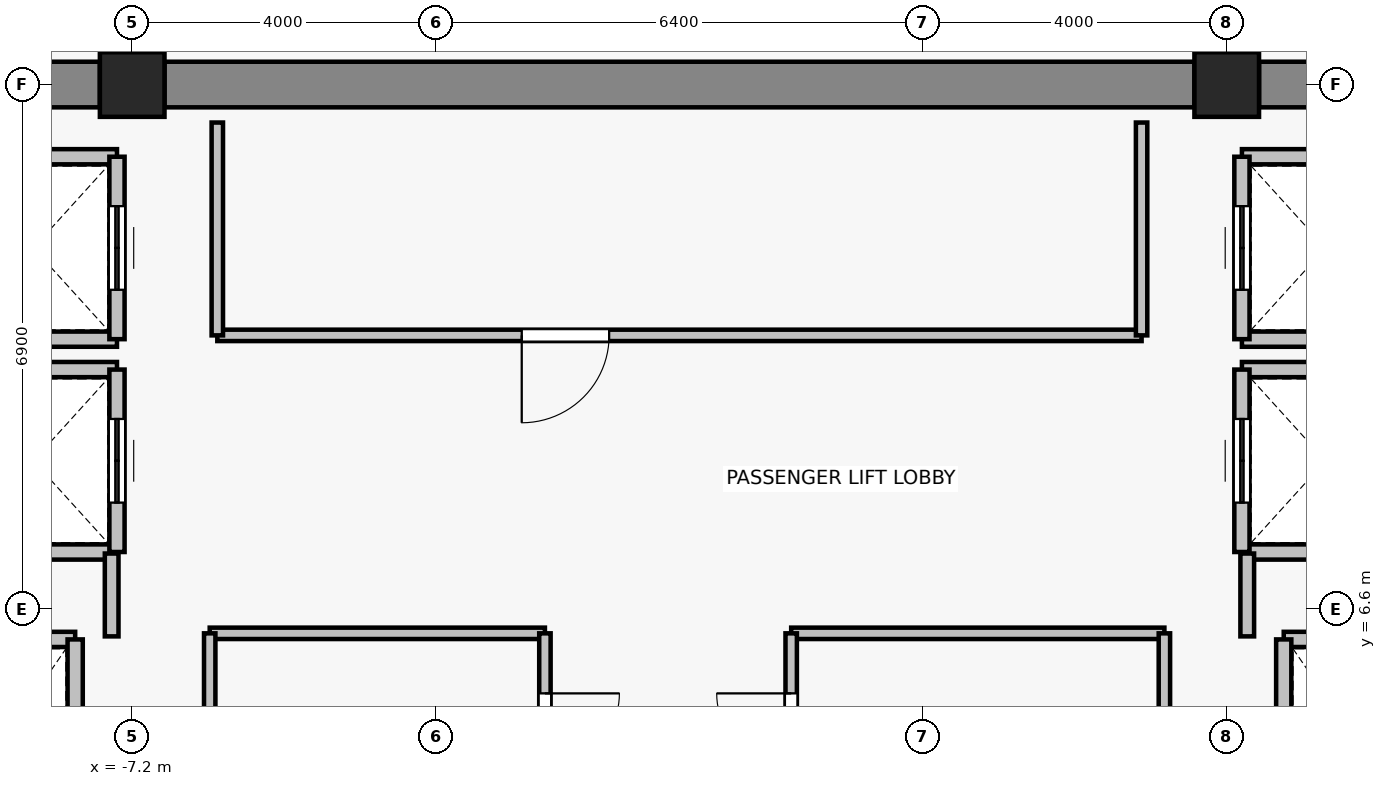
"""IFC4 building model, lengths in metres.
Left out: names, types, materials, properties, quantities, classifications, styles, units other than length and angle.
Written with IfcOpenShell. Run it as: python <this file> out.ifc"""

import sys

from ifc_helpers import new_model, si_unit, direction, frame, frame_2d, origin, origin_2d, place, context, subcontext, project, spatial, rectangle, extrude, source, transform, mapped, element, fill, save


model = new_model("IFC4")
c1 = context("Model", 3, precision=1e-05, world=origin(), true_north=direction((0.0, 1.0)))
c2 = subcontext(c1, "Body", "Model", "MODEL_VIEW")
j1 = project(units=[si_unit("LENGTHUNIT", "METRE"), si_unit("PLANEANGLEUNIT", "RADIAN")], contexts=[c1])
p1 = place(None, origin())
s1 = spatial("IfcSite", under=j1, at=p1, CompositionType="ELEMENT")
p2 = place(p1, origin())
s2 = spatial("IfcBuilding", under=s1, at=p2, CompositionType="ELEMENT")
p3 = place(p2, frame((0.0, 0.0, 268.3)))
s3 = spatial("IfcBuildingStorey", under=s2, at=p3, CompositionType="ELEMENT", Elevation=268.3)
for number, where, z_axis, x_axis in (
    (1, (-7.2, 13.5, 0.0), (0.0, 0.0, 1.0), (1.0, 0.0, 0.0)),
    (2, (7.2, 13.5, 0.0), (0.0, 0.0, 1.0), (1.0, 0.0, 0.0)),
):
    element("IfcColumn", number, at=place(p3, frame(where, z_axis=z_axis, x_axis=x_axis)), inside=s3, PredefinedType="COLUMN", context=c2, shape_type="SweptSolid", body=[
        extrude(rectangle(XDim=0.85, YDim=0.85, at=origin_2d()), origin(), (0.0, 0.0, 1.0), 3.3),
    ])
p4 = place(p3, frame((-13.975, 13.5, 0.0), z_axis=(0.0, 0.0, 1.0), x_axis=(1.0, 0.0, 0.0)))
e3 = element("IfcWall", 3, at=p4, inside=s3, PredefinedType="SHEAR", context=c2, shape_type="SweptSolid", body=[
    extrude(rectangle(XDim=6.35, YDim=0.6, at=frame_2d((3.175, 0.0))), origin(), (0.0, 0.0, 1.0), 3.08),
])
p5 = place(p3, frame((-6.775, 13.5, 0.0), z_axis=(0.0, 0.0, 1.0), x_axis=(1.0, 0.0, 0.0)))
e4 = element("IfcWall", 4, at=p5, inside=s3, PredefinedType="SHEAR", context=c2, shape_type="SweptSolid", body=[
    extrude(rectangle(XDim=13.55, YDim=0.6, at=frame_2d((6.775, 0.0))), origin(), (0.0, 0.0, 1.0), 3.08),
])
p6 = place(p3, frame((7.625, 13.5, 0.0), z_axis=(0.0, 0.0, 1.0), x_axis=(1.0, 0.0, 0.0)))
e5 = element("IfcWall", 5, at=p6, inside=s3, PredefinedType="SHEAR", context=c2, shape_type="SweptSolid", body=[
    extrude(rectangle(XDim=6.35, YDim=0.6, at=frame_2d((3.175, 0.0))), origin(), (0.0, 0.0, 1.0), 3.08),
])
p7 = place(p3, frame((-9.95, 6.2, 0.0), z_axis=(0.0, 0.0, 1.0), x_axis=(1.0, 0.0, 0.0)))
e6 = element("IfcWall", 6, at=p7, inside=s3, PredefinedType="SOLIDWALL", context=c2, shape_type="SweptSolid", body=[
    extrude(rectangle(XDim=2.0, YDim=0.2, at=frame_2d((1.0, 0.0))), origin(), (0.0, 0.0, 1.0), 3.08),
])
p8 = place(p3, frame((-7.95, 6.2, 0.0), z_axis=(0.0, 0.0, 1.0), x_axis=(0.0, -1.0, 0.0)))
e7 = element("IfcWall", 7, at=p8, inside=s3, PredefinedType="SOLIDWALL", context=c2, shape_type="SweptSolid", body=[
    extrude(rectangle(XDim=2.8, YDim=0.2, at=frame_2d((1.4, 0.0))), origin(), (0.0, 0.0, 1.0), 3.08),
])
p9 = place(p3, frame((7.95, 6.2, 0.0), z_axis=(0.0, 0.0, 1.0), x_axis=(1.0, 0.0, 0.0)))
e8 = element("IfcWall", 8, at=p9, inside=s3, PredefinedType="SOLIDWALL", context=c2, shape_type="SweptSolid", body=[
    extrude(rectangle(XDim=2.0, YDim=0.2, at=frame_2d((1.0, 0.0))), origin(), (0.0, 0.0, 1.0), 3.08),
])
p10 = place(p3, frame((7.95, 3.4, 0.0), z_axis=(0.0, 0.0, 1.0), x_axis=(0.0, 1.0, 0.0)))
e9 = element("IfcWall", 9, at=p10, inside=s3, PredefinedType="SOLIDWALL", context=c2, shape_type="SweptSolid", body=[
    extrude(rectangle(XDim=2.8, YDim=0.2, at=frame_2d((1.4, 0.0))), origin(), (0.0, 0.0, 1.0), 3.08),
])
for number, where, z_axis, x_axis in (
    (10, (-7.4, 7.35, 0.0), (0.0, 0.0, 1.0), (-1.0, 0.0, 0.0)),
    (11, (-9.6, 9.75, 0.0), (0.0, 0.0, 1.0), (1.0, 0.0, 0.0)),
):
    element("IfcWall", number, at=place(p3, frame(where, z_axis=z_axis, x_axis=x_axis)), inside=s3, PredefinedType="SOLIDWALL", context=c2, shape_type="SweptSolid", body=[
        extrude(rectangle(XDim=2.2, YDim=0.2, at=frame_2d((1.1, 0.0))), origin(), (0.0, 0.0, 1.0), 2.47),
    ])
p11 = place(p3, frame((-7.4, 9.75, 0.0), z_axis=(0.0, 0.0, 1.0), x_axis=(0.0, -1.0, 0.0)))
e12 = element("IfcWall", 12, at=p11, inside=s3, PredefinedType="SOLIDWALL", context=c2, shape_type="SweptSolid", body=[
    extrude(rectangle(XDim=2.4, YDim=0.2, at=frame_2d((1.2, 0.0))), origin(), (0.0, 0.0, 1.0), 2.47),
])
p12 = place(p11, frame((0.65, 0.0, 0.0)))
e13 = element("IfcOpeningElement", 13, at=p12, cuts=e12, PredefinedType="OPENING", context=c2, shape_type="SweptSolid", body=[
    extrude(rectangle(XDim=1.1, YDim=2.2, at=frame_2d((0.55, 1.1))), frame((0.0, 0.11, 0.0), z_axis=(0.0, -1.0, 0.0), x_axis=(1.0, 0.0, 0.0)), (0.0, 0.0, 1.0), 0.22),
])
for number, where, z_axis, x_axis in (
    (14, (-7.4, 10.15, 0.0), (0.0, 0.0, 1.0), (-1.0, 0.0, 0.0)),
    (15, (-9.6, 12.55, 0.0), (0.0, 0.0, 1.0), (1.0, 0.0, 0.0)),
):
    element("IfcWall", number, at=place(p3, frame(where, z_axis=z_axis, x_axis=x_axis)), inside=s3, PredefinedType="SOLIDWALL", context=c2, shape_type="SweptSolid", body=[
        extrude(rectangle(XDim=2.2, YDim=0.2, at=frame_2d((1.1, 0.0))), origin(), (0.0, 0.0, 1.0), 2.47),
    ])
p13 = place(p3, frame((-7.4, 12.55, 0.0), z_axis=(0.0, 0.0, 1.0), x_axis=(0.0, -1.0, 0.0)))
e16 = element("IfcWall", 16, at=p13, inside=s3, PredefinedType="SOLIDWALL", context=c2, shape_type="SweptSolid", body=[
    extrude(rectangle(XDim=2.4, YDim=0.2, at=frame_2d((1.2, 0.0))), origin(), (0.0, 0.0, 1.0), 2.47),
])
p14 = place(p13, frame((0.65, 0.0, 0.0)))
e17 = element("IfcOpeningElement", 17, at=p14, cuts=e16, PredefinedType="OPENING", context=c2, shape_type="SweptSolid", body=[
    extrude(rectangle(XDim=1.1, YDim=2.2, at=frame_2d((0.55, 1.1))), frame((0.0, 0.11, 0.0), z_axis=(0.0, -1.0, 0.0), x_axis=(1.0, 0.0, 0.0)), (0.0, 0.0, 1.0), 0.22),
])
for number, where, z_axis, x_axis in (
    (18, (9.6, 7.35, 0.0), (0.0, 0.0, 1.0), (-1.0, 0.0, 0.0)),
    (19, (7.4, 9.75, 0.0), (0.0, 0.0, 1.0), (1.0, 0.0, 0.0)),
):
    element("IfcWall", number, at=place(p3, frame(where, z_axis=z_axis, x_axis=x_axis)), inside=s3, PredefinedType="SOLIDWALL", context=c2, shape_type="SweptSolid", body=[
        extrude(rectangle(XDim=2.2, YDim=0.2, at=frame_2d((1.1, 0.0))), origin(), (0.0, 0.0, 1.0), 2.47),
    ])
p15 = place(p3, frame((7.4, 7.35, 0.0), z_axis=(0.0, 0.0, 1.0), x_axis=(0.0, 1.0, 0.0)))
e20 = element("IfcWall", 20, at=p15, inside=s3, PredefinedType="SOLIDWALL", context=c2, shape_type="SweptSolid", body=[
    extrude(rectangle(XDim=2.4, YDim=0.2, at=frame_2d((1.2, 0.0))), origin(), (0.0, 0.0, 1.0), 2.47),
])
p16 = place(p15, frame((0.65, 0.0, 0.0)))
e21 = element("IfcOpeningElement", 21, at=p16, cuts=e20, PredefinedType="OPENING", context=c2, shape_type="SweptSolid", body=[
    extrude(rectangle(XDim=1.1, YDim=2.2, at=frame_2d((0.55, 1.1))), frame((0.0, 0.11, 0.0), z_axis=(0.0, -1.0, 0.0), x_axis=(1.0, 0.0, 0.0)), (0.0, 0.0, 1.0), 0.22),
])
for number, where, z_axis, x_axis in (
    (22, (9.6, 10.15, 0.0), (0.0, 0.0, 1.0), (-1.0, 0.0, 0.0)),
    (23, (7.4, 12.55, 0.0), (0.0, 0.0, 1.0), (1.0, 0.0, 0.0)),
):
    element("IfcWall", number, at=place(p3, frame(where, z_axis=z_axis, x_axis=x_axis)), inside=s3, PredefinedType="SOLIDWALL", context=c2, shape_type="SweptSolid", body=[
        extrude(rectangle(XDim=2.2, YDim=0.2, at=frame_2d((1.1, 0.0))), origin(), (0.0, 0.0, 1.0), 2.47),
    ])
p17 = place(p3, frame((7.4, 10.15, 0.0), z_axis=(0.0, 0.0, 1.0), x_axis=(0.0, 1.0, 0.0)))
e24 = element("IfcWall", 24, at=p17, inside=s3, PredefinedType="SOLIDWALL", context=c2, shape_type="SweptSolid", body=[
    extrude(rectangle(XDim=2.4, YDim=0.2, at=frame_2d((1.2, 0.0))), origin(), (0.0, 0.0, 1.0), 2.47),
])
p18 = place(p17, frame((0.65, 0.0, 0.0)))
e25 = element("IfcOpeningElement", 25, at=p18, cuts=e24, PredefinedType="OPENING", context=c2, shape_type="SweptSolid", body=[
    extrude(rectangle(XDim=1.1, YDim=2.2, at=frame_2d((0.55, 1.1))), frame((0.0, 0.11, 0.0), z_axis=(0.0, -1.0, 0.0), x_axis=(1.0, 0.0, 0.0)), (0.0, 0.0, 1.0), 0.22),
])
for number, where, z_axis, x_axis in (
    (26, (-7.47, 7.33, 0.0), (0.0, 0.0, 1.0), (0.0, -1.0, 0.0)),
    (27, (7.47, 6.24, 0.0), (0.0, 0.0, 1.0), (0.0, 1.0, 0.0)),
):
    element("IfcWall", number, at=place(p3, frame(where, z_axis=z_axis, x_axis=x_axis)), inside=s3, PredefinedType="PARTITIONING", context=c2, shape_type="SweptSolid", body=[
        extrude(rectangle(XDim=1.09, YDim=0.18, at=frame_2d((0.545, 0.0))), origin(), (0.0, 0.0, 1.0), 2.47),
    ])
p19 = place(p3, frame((6.08, 10.2, 0.0), z_axis=(0.0, 0.0, 1.0), x_axis=(-1.0, 0.0, 0.0)))
e28 = element("IfcWall", 28, at=p19, inside=s3, PredefinedType="PARTITIONING", context=c2, shape_type="SweptSolid", body=[
    extrude(rectangle(XDim=12.16, YDim=0.15, at=frame_2d((6.08, 0.0))), origin(), (0.0, 0.0, 1.0), 3.08),
])
p20 = place(p19, frame((7.005, 0.0, 0.0)))
e29 = element("IfcOpeningElement", 29, at=p20, cuts=e28, PredefinedType="OPENING", context=c2, shape_type="SweptSolid", body=[
    extrude(rectangle(XDim=1.15, YDim=2.15, at=frame_2d((0.575, 1.075))), frame((0.0, 0.085, 0.0), z_axis=(0.0, -1.0, 0.0), x_axis=(1.0, 0.0, 0.0)), (0.0, 0.0, 1.0), 0.17),
])
for number, where, z_axis, x_axis in (
    (30, (-6.08, 10.2, 0.0), (0.0, 0.0, 1.0), (0.0, 1.0, 0.0)),
    (31, (6.08, 13.0, 0.0), (0.0, 0.0, 1.0), (0.0, -1.0, 0.0)),
):
    element("IfcWall", number, at=place(p3, frame(where, z_axis=z_axis, x_axis=x_axis)), inside=s3, PredefinedType="PARTITIONING", context=c2, shape_type="SweptSolid", body=[
        extrude(rectangle(XDim=2.8, YDim=0.15, at=frame_2d((1.4, 0.0))), origin(), (0.0, 0.0, 1.0), 3.08),
    ])
p21 = place(p3, frame((-6.18, 6.28, 0.0), z_axis=(0.0, 0.0, 1.0), x_axis=(1.0, 0.0, 0.0)))
e32 = element("IfcWall", 32, at=p21, inside=s3, PredefinedType="PARTITIONING", context=c2, shape_type="SweptSolid", body=[
    extrude(rectangle(XDim=4.41, YDim=0.15, at=frame_2d((2.205, 0.0))), origin(), (0.0, 0.0, 1.0), 3.08),
])
p22 = place(p3, frame((-6.18, 3.76, 0.0), z_axis=(0.0, 0.0, 1.0), x_axis=(0.0, 1.0, 0.0)))
e33 = element("IfcWall", 33, at=p22, inside=s3, PredefinedType="PARTITIONING", context=c2, shape_type="SweptSolid", body=[
    extrude(rectangle(XDim=2.52, YDim=0.15, at=frame_2d((1.26, 0.0))), origin(), (0.0, 0.0, 1.0), 3.08),
])
p23 = place(p3, frame((-1.77, 6.28, 0.0), z_axis=(0.0, 0.0, 1.0), x_axis=(0.0, -1.0, 0.0)))
e34 = element("IfcWall", 34, at=p23, inside=s3, PredefinedType="PARTITIONING", context=c2, shape_type="SweptSolid", body=[
    extrude(rectangle(XDim=2.52, YDim=0.15, at=frame_2d((1.26, 0.0))), origin(), (0.0, 0.0, 1.0), 3.08),
])
p24 = place(p23, frame((0.79, 0.0, 0.0)))
e35 = element("IfcOpeningElement", 35, at=p24, cuts=e34, PredefinedType="OPENING", context=c2, shape_type="SweptSolid", body=[
    extrude(rectangle(XDim=0.98, YDim=2.15, at=frame_2d((0.49, 1.075))), frame((0.0, 0.085, 0.0), z_axis=(0.0, -1.0, 0.0), x_axis=(1.0, 0.0, 0.0)), (0.0, 0.0, 1.0), 0.17),
])
p25 = place(p3, frame((1.47, 6.28, 0.0), z_axis=(0.0, 0.0, 1.0), x_axis=(1.0, 0.0, 0.0)))
e36 = element("IfcWall", 36, at=p25, inside=s3, PredefinedType="PARTITIONING", context=c2, shape_type="SweptSolid", body=[
    extrude(rectangle(XDim=4.91, YDim=0.15, at=frame_2d((2.455, 0.0))), origin(), (0.0, 0.0, 1.0), 3.08),
])
p26 = place(p3, frame((1.47, 3.76, 0.0), z_axis=(0.0, 0.0, 1.0), x_axis=(0.0, 1.0, 0.0)))
e37 = element("IfcWall", 37, at=p26, inside=s3, PredefinedType="PARTITIONING", context=c2, shape_type="SweptSolid", body=[
    extrude(rectangle(XDim=2.52, YDim=0.15, at=frame_2d((1.26, 0.0))), origin(), (0.0, 0.0, 1.0), 3.08),
])
p27 = place(p26, frame((0.75, 0.0, 0.0)))
e38 = element("IfcOpeningElement", 38, at=p27, cuts=e37, PredefinedType="OPENING", context=c2, shape_type="SweptSolid", body=[
    extrude(rectangle(XDim=0.98, YDim=2.15, at=frame_2d((0.49, 1.075))), frame((0.0, 0.085, 0.0), z_axis=(0.0, -1.0, 0.0), x_axis=(1.0, 0.0, 0.0)), (0.0, 0.0, 1.0), 0.17),
])
p28 = place(p3, frame((6.38, 6.28, 0.0), z_axis=(0.0, 0.0, 1.0), x_axis=(0.0, -1.0, 0.0)))
e39 = element("IfcWall", 39, at=p28, inside=s3, PredefinedType="PARTITIONING", context=c2, shape_type="SweptSolid", body=[
    extrude(rectangle(XDim=2.52, YDim=0.15, at=frame_2d((1.26, 0.0))), origin(), (0.0, 0.0, 1.0), 3.08),
])
m1 = source(origin(), c2, "Body", "SweptSolid", [
    extrude(rectangle(XDim=1.1, YDim=2.2, at=frame_2d((0.55, 1.1))), frame((0.0, 0.025, 0.0), z_axis=(0.0, -1.0, 0.0), x_axis=(1.0, 0.0, 0.0)), (0.0, 0.0, 1.0), 0.05),
])
p29 = place(p12, origin())
e40 = element("IfcDoor", 40, at=p29, inside=s3, OperationType="DOUBLE_DOOR_SLIDING", PredefinedType="DOOR", context=c2, shape_type="MappedRepresentation", body=[
    mapped(m1, transform((0.0, 0.0, 0.0), x_axis=(1.0, 0.0, 0.0), y_axis=(0.0, 1.0, 0.0), z_axis=(0.0, 0.0, 1.0), scale=1.0)),
])
fill(e13, e40)
p30 = place(p14, origin())
e41 = element("IfcDoor", 41, at=p30, inside=s3, OperationType="DOUBLE_DOOR_SLIDING", PredefinedType="DOOR", context=c2, shape_type="MappedRepresentation", body=[
    mapped(m1, transform((0.0, 0.0, 0.0), x_axis=(1.0, 0.0, 0.0), y_axis=(0.0, 1.0, 0.0), z_axis=(0.0, 0.0, 1.0), scale=1.0)),
])
fill(e17, e41)
p31 = place(p16, origin())
e42 = element("IfcDoor", 42, at=p31, inside=s3, OperationType="DOUBLE_DOOR_SLIDING", PredefinedType="DOOR", context=c2, shape_type="MappedRepresentation", body=[
    mapped(m1, transform((0.0, 0.0, 0.0), x_axis=(1.0, 0.0, 0.0), y_axis=(0.0, 1.0, 0.0), z_axis=(0.0, 0.0, 1.0), scale=1.0)),
])
fill(e21, e42)
p32 = place(p18, origin())
e43 = element("IfcDoor", 43, at=p32, inside=s3, OperationType="DOUBLE_DOOR_SLIDING", PredefinedType="DOOR", context=c2, shape_type="MappedRepresentation", body=[
    mapped(m1, transform((0.0, 0.0, 0.0), x_axis=(1.0, 0.0, 0.0), y_axis=(0.0, 1.0, 0.0), z_axis=(0.0, 0.0, 1.0), scale=1.0)),
])
fill(e25, e43)
m2 = source(origin(), c2, "Body", "SweptSolid", [
    extrude(rectangle(XDim=1.15, YDim=2.15, at=frame_2d((0.575, 1.075))), frame((0.0, 0.025, 0.0), z_axis=(0.0, -1.0, 0.0), x_axis=(1.0, 0.0, 0.0)), (0.0, 0.0, 1.0), 0.05),
])
p33 = place(p20, origin())
e44 = element("IfcDoor", 44, at=p33, inside=s3, OperationType="SINGLE_SWING_RIGHT", PredefinedType="DOOR", context=c2, shape_type="MappedRepresentation", body=[
    mapped(m2, transform((0.0, 0.0, 0.0), x_axis=(1.0, 0.0, 0.0), y_axis=(0.0, 1.0, 0.0), z_axis=(0.0, 0.0, 1.0), scale=1.0)),
])
fill(e29, e44)
m3 = source(origin(), c2, "Body", "SweptSolid", [
    extrude(rectangle(XDim=0.98, YDim=2.15, at=frame_2d((0.49, 1.075))), frame((0.0, 0.025, 0.0), z_axis=(0.0, -1.0, 0.0), x_axis=(1.0, 0.0, 0.0)), (0.0, 0.0, 1.0), 0.05),
])
p34 = place(p24, origin())
e45 = element("IfcDoor", 45, at=p34, inside=s3, OperationType="SINGLE_SWING_LEFT", PredefinedType="DOOR", context=c2, shape_type="MappedRepresentation", body=[
    mapped(m3, transform((0.0, 0.0, 0.0), x_axis=(1.0, 0.0, 0.0), y_axis=(0.0, 1.0, 0.0), z_axis=(0.0, 0.0, 1.0), scale=1.0)),
])
fill(e35, e45)
p35 = place(p27, origin())
e46 = element("IfcDoor", 46, at=p35, inside=s3, OperationType="SINGLE_SWING_RIGHT", PredefinedType="DOOR", context=c2, shape_type="MappedRepresentation", body=[
    mapped(m3, transform((0.0, 0.0, 0.0), x_axis=(1.0, 0.0, 0.0), y_axis=(0.0, 1.0, 0.0), z_axis=(0.0, 0.0, 1.0), scale=1.0)),
])
fill(e38, e46)
save(model, sys.argv[1])
